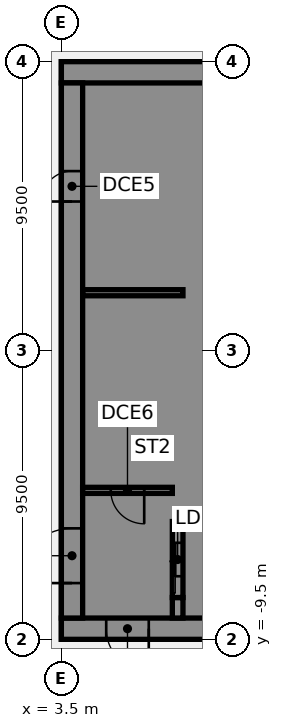
"""IFC4 building model, lengths in metres.
Left out: names, types, materials, properties, quantities, classifications, styles, units other than length and angle.
Written with IfcOpenShell. Run it as: python <this file> out.ifc"""

import sys

from ifc_helpers import new_model, si_unit, direction, frame, frame_2d, origin, place, context, subcontext, project, spatial, polyline, rectangle, outline, extrude, element, fill, save


model = new_model("IFC4")
c1 = context("Model", 3, precision=1e-05, world=origin(), true_north=direction((0.0, 1.0)))
c2 = subcontext(c1, "Body", "Model", "MODEL_VIEW")
j1 = project(units=[si_unit("LENGTHUNIT", "METRE"), si_unit("PLANEANGLEUNIT", "RADIAN")], contexts=[c1])
p1 = place(None, origin())
s1 = spatial("IfcSite", under=j1, at=p1, CompositionType="ELEMENT")
p2 = place(p1, origin())
s2 = spatial("IfcBuilding", under=s1, at=p2, CompositionType="ELEMENT")
p3 = place(p2, frame((0.0, 0.0, 34.0)))
s3 = spatial("IfcBuildingStorey", under=s2, at=p3, CompositionType="ELEMENT", Elevation=34.0)
p4 = place(p3, frame((16.5, -9.15, 0.0), z_axis=(0.0, 0.0, 1.0), x_axis=(-1.0, 0.0, 0.0)))
e1 = element("IfcWall", 1, at=p4, inside=s3, PredefinedType="SHEAR", context=c2, shape_type="SweptSolid", body=[
    extrude(rectangle(XDim=13.0, YDim=0.7, at=frame_2d((6.5, 0.0))), origin(), (0.0, 0.0, 1.0), 3.61),
])
p5 = place(p4, frame((4.15, 0.0, 0.0)))
e2 = element("IfcOpeningElement", 2, at=p5, cuts=e1, PredefinedType="OPENING", context=c2, shape_type="SweptSolid", body=[
    extrude(rectangle(XDim=1.4, YDim=2.1, at=frame_2d((0.7, 1.05))), frame((0.0, 0.36, 0.0), z_axis=(0.0, -1.0, 0.0), x_axis=(1.0, 0.0, 0.0)), (0.0, 0.0, 1.0), 0.72),
])
p6 = place(p4, frame((10.125, 0.0, 0.0)))
e3 = element("IfcOpeningElement", 3, at=p6, cuts=e1, PredefinedType="OPENING", context=c2, shape_type="SweptSolid", body=[
    extrude(rectangle(XDim=1.4, YDim=2.1, at=frame_2d((0.7, 1.05))), frame((0.0, 0.36, 0.0), z_axis=(0.0, -1.0, 0.0), x_axis=(1.0, 0.0, 0.0)), (0.0, 0.0, 1.0), 0.72),
])
p7 = place(p3, frame((16.5, 9.15, 0.0), z_axis=(0.0, 0.0, 1.0), x_axis=(-1.0, 0.0, 0.0)))
e4 = element("IfcWall", 4, at=p7, inside=s3, PredefinedType="SHEAR", context=c2, shape_type="SweptSolid", body=[
    extrude(rectangle(XDim=13.0, YDim=0.7, at=frame_2d((6.5, 0.0))), origin(), (0.0, 0.0, 1.0), 3.61),
])
p8 = place(p3, origin())
e5 = element("IfcWall", 5, at=p8, inside=s3, PredefinedType="SHEAR", context=c2, shape_type="SweptSolid", body=[
    extrude(outline(polyline([(9.8, -5.375), (7.5, -5.375), (7.5, -2.875), (9.8, -2.875), (9.8, -2.625), (7.5, -2.625), (7.5, -0.125), (9.8, -0.125), (9.8, 0.125), (7.5, 0.125), (7.5, 2.625), (9.8, 2.625), (9.8, 2.875), (7.5, 2.875), (7.5, 5.375), (9.8, 5.375), (9.8, 5.625), (7.5, 5.625), (7.5, 8.125), (9.8, 8.125), (9.8, 8.8), (7.5, 8.8), (7.15, 8.8), (7.15, -5.625), (7.5, -5.625), (9.8, -5.625), (9.8, -5.375)])), origin(), (0.0, 0.0, 1.0), 3.61),
])
p9 = place(p3, origin())
e6 = element("IfcWall", 6, at=p9, inside=s3, PredefinedType="SHEAR", context=c2, shape_type="SweptSolid", body=[
    extrude(outline(polyline([(7.5, -8.125), (7.5, -8.8), (9.8, -8.8), (9.8, -8.125), (9.8, -5.625), (9.55, -5.625), (9.55, -8.125), (7.5, -8.125)])), origin(), (0.0, 0.0, 1.0), 3.61),
])
p10 = place(p3, frame((7.325, -8.8, 0.0), z_axis=(0.0, 0.0, 1.0), x_axis=(0.0, 1.0, 0.0)))
e7 = element("IfcWall", 7, at=p10, inside=s3, PredefinedType="SHEAR", context=c2, shape_type="SweptSolid", body=[
    extrude(rectangle(XDim=0.675, YDim=0.35, at=frame_2d((0.337, 0.0))), origin(), (0.0, 0.0, 1.0), 3.61),
])
p11 = place(p3, frame((7.5, 1.9, 0.0), z_axis=(0.0, 0.0, 1.0), x_axis=(-1.0, 0.0, 0.0)))
e8 = element("IfcWall", 8, at=p11, inside=s3, PredefinedType="SHEAR", context=c2, shape_type="SweptSolid", body=[
    extrude(rectangle(XDim=3.3, YDim=0.2, at=frame_2d((1.65, 0.0))), origin(), (0.0, 0.0, 1.0), 3.61),
])
p12 = place(p3, frame((7.325, -8.125, 0.0), z_axis=(0.0, 0.0, 1.0), x_axis=(0.0, 1.0, 0.0)))
e9 = element("IfcWall", 9, at=p12, inside=s3, PredefinedType="SHEAR", context=c2, shape_type="SweptSolid", body=[
    extrude(rectangle(XDim=2.5, YDim=0.35, at=frame_2d((1.25, 0.0))), origin(), (0.0, 0.0, 1.0), 3.61),
])
p13 = place(p12, frame((0.7, 0.0, 0.0)))
e10 = element("IfcOpeningElement", 10, at=p13, cuts=e9, PredefinedType="OPENING", context=c2, shape_type="SweptSolid", body=[
    extrude(rectangle(XDim=1.1, YDim=2.1, at=frame_2d((0.55, 1.05))), frame((0.0, 0.185, 0.0), z_axis=(0.0, -1.0, 0.0), x_axis=(1.0, 0.0, 0.0)), (0.0, 0.0, 1.0), 0.37),
])
p14 = place(p3, frame((3.85, -8.8, 0.0), z_axis=(0.0, 0.0, 1.0), x_axis=(0.0, 1.0, 0.0)))
e11 = element("IfcWall", 11, at=p14, inside=s3, PredefinedType="SHEAR", context=c2, shape_type="SweptSolid", body=[
    extrude(rectangle(XDim=17.6, YDim=0.7, at=frame_2d((8.8, 0.0))), origin(), (0.0, 0.0, 1.0), 3.61),
])
p15 = place(p14, frame((1.15, 0.0, 0.0)))
e12 = element("IfcOpeningElement", 12, at=p15, cuts=e11, PredefinedType="OPENING", context=c2, shape_type="SweptSolid", body=[
    extrude(rectangle(XDim=1.8, YDim=2.1, at=frame_2d((0.9, 1.05))), frame((0.0, 0.36, 0.0), z_axis=(0.0, -1.0, 0.0), x_axis=(1.0, 0.0, 0.0)), (0.0, 0.0, 1.0), 0.72),
])
p16 = place(p14, frame((13.7, 0.0, 0.0)))
e13 = element("IfcOpeningElement", 13, at=p16, cuts=e11, PredefinedType="OPENING", context=c2, shape_type="SweptSolid", body=[
    extrude(rectangle(XDim=1.0, YDim=2.1, at=frame_2d((0.5, 1.05))), frame((0.0, 0.36, 0.0), z_axis=(0.0, -1.0, 0.0), x_axis=(1.0, 0.0, 0.0)), (0.0, 0.0, 1.0), 0.72),
])
p17 = place(p3, frame((7.15, -4.6, 0.0), z_axis=(0.0, 0.0, 1.0), x_axis=(-1.0, 0.0, 0.0)))
e14 = element("IfcWall", 14, at=p17, inside=s3, PredefinedType="SHEAR", context=c2, shape_type="SweptSolid", body=[
    extrude(rectangle(XDim=2.95, YDim=0.2, at=frame_2d((1.475, 0.0))), origin(), (0.0, 0.0, 1.0), 3.61),
])
p18 = place(p17, frame((0.925, 0.0, 0.0)))
e15 = element("IfcOpeningElement", 15, at=p18, cuts=e14, PredefinedType="OPENING", context=c2, shape_type="SweptSolid", body=[
    extrude(rectangle(XDim=1.1, YDim=2.1, at=frame_2d((0.55, 1.05))), frame((0.0, 0.11, 0.0), z_axis=(0.0, -1.0, 0.0), x_axis=(1.0, 0.0, 0.0)), (0.0, 0.0, 1.0), 0.22),
])
p19 = place(p6, origin())
e16 = element("IfcDoor", 16, at=p19, inside=s3, OperationType="SINGLE_SWING_LEFT", PredefinedType="DOOR", context=c2, shape_type="SweptSolid", body=[
    extrude(rectangle(XDim=1.4, YDim=2.1, at=frame_2d((0.7, 1.05))), frame((0.0, 0.025, 0.0), z_axis=(0.0, -1.0, 0.0), x_axis=(1.0, 0.0, 0.0)), (0.0, 0.0, 1.0), 0.05),
])
fill(e3, e16)
p20 = place(p15, origin())
e17 = element("IfcDoor", 17, at=p20, inside=s3, OperationType="SINGLE_SWING_LEFT", PredefinedType="DOOR", context=c2, shape_type="SweptSolid", body=[
    extrude(rectangle(XDim=1.8, YDim=2.1, at=frame_2d((0.9, 1.05))), frame((0.0, 0.025, 0.0), z_axis=(0.0, -1.0, 0.0), x_axis=(1.0, 0.0, 0.0)), (0.0, 0.0, 1.0), 0.05),
])
fill(e12, e17)
p21 = place(p16, origin())
e18 = element("IfcDoor", 18, at=p21, inside=s3, OperationType="SINGLE_SWING_LEFT", PredefinedType="DOOR", context=c2, shape_type="SweptSolid", body=[
    extrude(rectangle(XDim=1.0, YDim=2.1, at=frame_2d((0.5, 1.05))), frame((0.0, 0.025, 0.0), z_axis=(0.0, -1.0, 0.0), x_axis=(1.0, 0.0, 0.0)), (0.0, 0.0, 1.0), 0.05),
])
fill(e13, e18)
p22 = place(p18, origin())
e19 = element("IfcDoor", 19, at=p22, inside=s3, OperationType="SINGLE_SWING_LEFT", PredefinedType="DOOR", context=c2, shape_type="SweptSolid", body=[
    extrude(rectangle(XDim=1.1, YDim=2.1, at=frame_2d((0.55, 1.05))), frame((0.0, 0.025, 0.0), z_axis=(0.0, -1.0, 0.0), x_axis=(1.0, 0.0, 0.0)), (0.0, 0.0, 1.0), 0.05),
])
fill(e15, e19)
p23 = place(p13, origin())
e20 = element("IfcDoor", 20, at=p23, inside=s3, OperationType="SLIDING_TO_LEFT", PredefinedType="DOOR", context=c2, shape_type="SweptSolid", body=[
    extrude(rectangle(XDim=1.1, YDim=2.1, at=frame_2d((0.55, 1.05))), frame((0.0, 0.025, 0.0), z_axis=(0.0, -1.0, 0.0), x_axis=(1.0, 0.0, 0.0)), (0.0, 0.0, 1.0), 0.05),
])
fill(e10, e20)
save(model, sys.argv[1])
